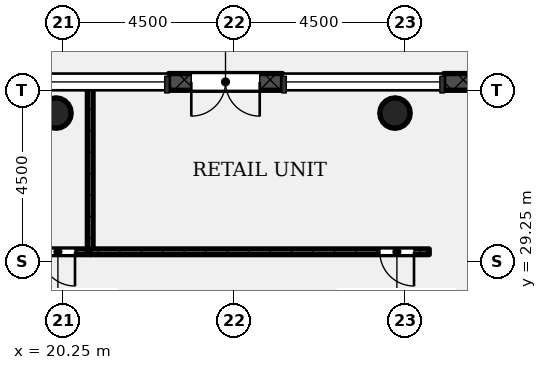
"""IFC4 building model, lengths in metres.
Left out: names, types, materials, properties, quantities, classifications, styles, units other than length and angle.
Written with IfcOpenShell. Run it as: python <this file> out.ifc"""

import sys

from ifc_helpers import new_model, si_unit, direction, frame, frame_2d, origin, origin_2d, place, context, subcontext, project, spatial, rectangle, hollow_circle, extrude, element, fill, save


model = new_model("IFC4")
c1 = context("Model", 3, precision=1e-05, world=origin(), true_north=direction((0.0, 1.0)))
c2 = subcontext(c1, "Body", "Model", "MODEL_VIEW")
j1 = project(units=[si_unit("LENGTHUNIT", "METRE"), si_unit("PLANEANGLEUNIT", "RADIAN")], contexts=[c1])
p1 = place(None, origin())
s1 = spatial("IfcSite", under=j1, at=p1, CompositionType="ELEMENT")
p2 = place(p1, origin())
s2 = spatial("IfcBuilding", under=s1, at=p2, CompositionType="ELEMENT")
p3 = place(p2, origin())
s3 = spatial("IfcBuildingStorey", under=s2, at=p3, CompositionType="ELEMENT", Elevation=0.0)
for number, where, z_axis, x_axis in (
    (1, (20.05, 33.15, -0.4), (0.0, 0.0, 1.0), (1.0, 0.0, 0.0)),
    (2, (28.97, 33.15, -0.4), (0.0, 0.0, 1.0), (1.0, 0.0, 0.0)),
):
    element("IfcColumn", number, at=place(p3, frame(where, z_axis=z_axis, x_axis=x_axis)), inside=s3, PredefinedType="COLUMN", context=c2, shape_type="SweptSolid", body=[
        extrude(hollow_circle(Radius=0.4, WallThickness=0.028, at=origin_2d()), origin(), (0.0, 0.0, 1.0), 6.4),
    ])
p4 = place(p3, frame((33.25, 33.97, 0.0), z_axis=(0.0, 0.0, 1.0), x_axis=(-1.0, 0.0, 0.0)))
e3 = element("IfcWall", 3, at=p4, inside=s3, PredefinedType="STANDARD", context=c2, shape_type="SweptSolid", body=[
    extrude(rectangle(XDim=3.0, YDim=0.44, at=frame_2d((1.5, 0.0))), origin(), (0.0, 0.0, 1.0), 5.7),
])
p5 = place(p4, frame((0.9, 0.0, 0.0)))
e4 = element("IfcOpeningElement", 4, at=p5, cuts=e3, PredefinedType="OPENING", context=c2, shape_type="SweptSolid", body=[
    extrude(rectangle(XDim=1.2, YDim=2.1, at=frame_2d((0.6, 1.05))), frame((0.0, 0.23, 0.0), z_axis=(0.0, -1.0, 0.0), x_axis=(1.0, 0.0, 0.0)), (0.0, 0.0, 1.0), 0.46),
])
p6 = place(p3, frame((26.01, 33.97, 0.0), z_axis=(0.0, 0.0, 1.0), x_axis=(-1.0, 0.0, 0.0)))
e5 = element("IfcWall", 5, at=p6, inside=s3, PredefinedType="STANDARD", context=c2, shape_type="SweptSolid", body=[
    extrude(rectangle(XDim=3.0, YDim=0.44, at=frame_2d((1.5, 0.0))), origin(), (0.0, 0.0, 1.0), 5.7),
])
p7 = place(p6, frame((0.6, 0.0, 0.0)))
e6 = element("IfcOpeningElement", 6, at=p7, cuts=e5, PredefinedType="OPENING", context=c2, shape_type="SweptSolid", body=[
    extrude(rectangle(XDim=1.8, YDim=2.1, at=frame_2d((0.9, 1.05))), frame((0.0, 0.23, 0.0), z_axis=(0.0, -1.0, 0.0), x_axis=(1.0, 0.0, 0.0)), (0.0, 0.0, 1.0), 0.46),
])
p8 = place(p3, frame((20.95, 29.5, 0.0), z_axis=(0.0, 0.0, 1.0), x_axis=(-1.0, 0.0, 0.0)))
e7 = element("IfcWall", 7, at=p8, inside=s3, PredefinedType="PARTITIONING", context=c2, shape_type="SweptSolid", body=[
    extrude(rectangle(XDim=8.92, YDim=0.15, at=frame_2d((4.46, 0.0))), origin(), (0.0, 0.0, 1.0), 5.58),
])
p9 = place(p8, frame((0.4, 0.0, 0.0)))
e8 = element("IfcOpeningElement", 8, at=p9, cuts=e7, PredefinedType="OPENING", context=c2, shape_type="SweptSolid", body=[
    extrude(rectangle(XDim=0.9, YDim=2.1, at=frame_2d((0.45, 1.05))), frame((0.0, 0.085, 0.0), z_axis=(0.0, -1.0, 0.0), x_axis=(1.0, 0.0, 0.0)), (0.0, 0.0, 1.0), 0.17),
])
p10 = place(p3, frame((20.95, 33.85, 0.0), z_axis=(0.0, 0.0, 1.0), x_axis=(0.0, -1.0, 0.0)))
e9 = element("IfcWall", 9, at=p10, inside=s3, PredefinedType="PARTITIONING", context=c2, shape_type="SweptSolid", body=[
    extrude(rectangle(XDim=4.35, YDim=0.15, at=frame_2d((2.175, 0.0))), origin(), (0.0, 0.0, 1.0), 5.58),
])
p11 = place(p3, frame((29.87, 29.5, 0.0), z_axis=(0.0, 0.0, 1.0), x_axis=(-1.0, 0.0, 0.0)))
e10 = element("IfcWall", 10, at=p11, inside=s3, PredefinedType="PARTITIONING", context=c2, shape_type="SweptSolid", body=[
    extrude(rectangle(XDim=8.92, YDim=0.15, at=frame_2d((4.46, 0.0))), origin(), (0.0, 0.0, 1.0), 5.58),
])
p12 = place(p11, frame((0.4, 0.0, 0.0)))
e11 = element("IfcOpeningElement", 11, at=p12, cuts=e10, PredefinedType="OPENING", context=c2, shape_type="SweptSolid", body=[
    extrude(rectangle(XDim=0.9, YDim=2.1, at=frame_2d((0.45, 1.05))), frame((0.0, 0.085, 0.0), z_axis=(0.0, -1.0, 0.0), x_axis=(1.0, 0.0, 0.0)), (0.0, 0.0, 1.0), 0.17),
])
p13 = place(p7, origin())
e12 = element("IfcDoor", 12, at=p13, inside=s3, OperationType="DOUBLE_DOOR_DOUBLE_SWING", PredefinedType="DOOR", context=c2, shape_type="SweptSolid", body=[
    extrude(rectangle(XDim=1.8, YDim=2.1, at=frame_2d((0.9, 1.05))), frame((0.0, 0.025, 0.0), z_axis=(0.0, -1.0, 0.0), x_axis=(1.0, 0.0, 0.0)), (0.0, 0.0, 1.0), 0.05),
])
fill(e6, e12)
p14 = place(p9, origin())
e13 = element("IfcDoor", 13, at=p14, inside=s3, OperationType="SINGLE_SWING_RIGHT", PredefinedType="DOOR", context=c2, shape_type="SweptSolid", body=[
    extrude(rectangle(XDim=0.9, YDim=2.1, at=frame_2d((0.45, 1.05))), frame((0.0, 0.025, 0.0), z_axis=(0.0, -1.0, 0.0), x_axis=(1.0, 0.0, 0.0)), (0.0, 0.0, 1.0), 0.05),
])
fill(e8, e13)
p15 = place(p12, origin())
e14 = element("IfcDoor", 14, at=p15, inside=s3, OperationType="SINGLE_SWING_RIGHT", PredefinedType="DOOR", context=c2, shape_type="SweptSolid", body=[
    extrude(rectangle(XDim=0.9, YDim=2.1, at=frame_2d((0.45, 1.05))), frame((0.0, 0.025, 0.0), z_axis=(0.0, -1.0, 0.0), x_axis=(1.0, 0.0, 0.0)), (0.0, 0.0, 1.0), 0.05),
])
fill(e11, e14)
save(model, sys.argv[1])
